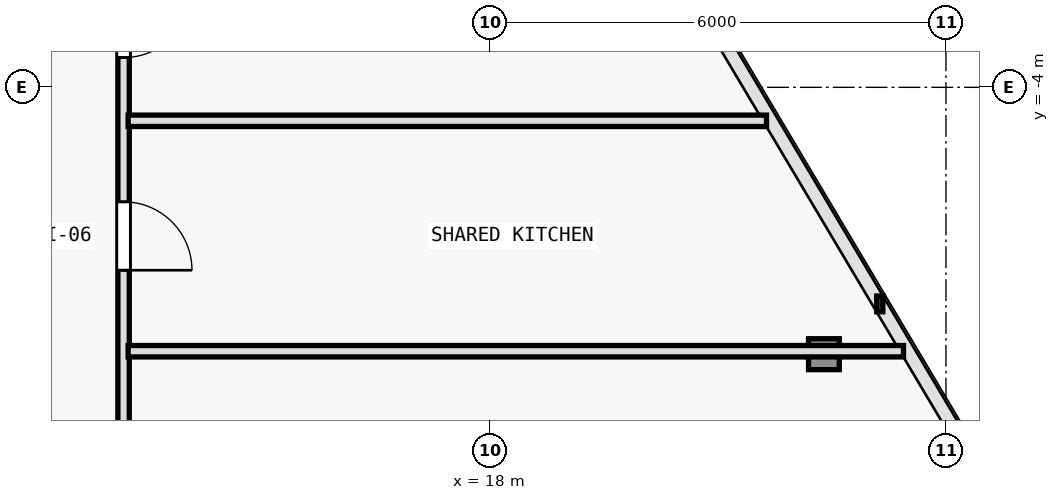
"""IFC4 building model, lengths in metres.
Left out: names, types, materials, properties, quantities, classifications, styles, units other than length and angle.
Written with IfcOpenShell. Run it as: python <this file> out.ifc"""

import sys

from ifc_helpers import new_model, si_unit, direction, frame, frame_2d, origin, origin_2d, place, context, subcontext, project, spatial, rectangle, i_section, extrude, element, fill, save


model = new_model("IFC4")
c1 = context("Model", 3, precision=1e-05, world=origin(), true_north=direction((0.0, 1.0)))
c2 = subcontext(c1, "Body", "Model", "MODEL_VIEW")
j1 = project(units=[si_unit("LENGTHUNIT", "METRE"), si_unit("PLANEANGLEUNIT", "RADIAN")], contexts=[c1])
p1 = place(None, origin())
s1 = spatial("IfcSite", under=j1, at=p1, CompositionType="ELEMENT")
p2 = place(p1, origin())
s2 = spatial("IfcBuilding", under=s1, at=p2, CompositionType="ELEMENT")
p3 = place(p2, frame((0.0, 0.0, 138.6)))
s3 = spatial("IfcBuildingStorey", under=s2, at=p3, CompositionType="ELEMENT", Elevation=138.6)
p4 = place(p3, frame((22.394, -7.51, 0.005), z_axis=(-0.026037763904, 0.021550838532, 0.999428634876), x_axis=(-0.637608877662, -0.770360252821, 0.0)))
e1 = element("IfcColumn", 1, at=p4, inside=s3, PredefinedType="COLUMN", context=c2, shape_type="SweptSolid", body=[
    extrude(i_section(OverallWidth=0.404, OverallDepth=0.407, WebThickness=0.017, FlangeThickness=0.028, FilletRadius=0.015, at=origin_2d()), origin(), (0.0, 0.0, 1.0), 3.591),
])
p5 = place(p3, frame((13.18, 8.444, 0.0), z_axis=(0.0, 0.0, 1.0), x_axis=(0.0, -1.0, 0.0)))
e2 = element("IfcWall", 2, at=p5, inside=s3, PredefinedType="PARTITIONING", context=c2, shape_type="SweptSolid", body=[
    extrude(rectangle(XDim=20.004, YDim=0.15, at=frame_2d((10.002, 0.0))), origin(), (0.0, 0.0, 1.0), 2.705),
])
p6 = place(p5, frame((17.421, 0.0, 0.0)))
e3 = element("IfcOpeningElement", 3, at=p6, cuts=e2, PredefinedType="OPENING", context=c2, shape_type="SweptSolid", body=[
    extrude(rectangle(XDim=0.9, YDim=2.1, at=frame_2d((0.45, 1.05))), frame((0.0, 0.085, 0.0), z_axis=(0.0, -1.0, 0.0), x_axis=(1.0, 0.0, 0.0)), (0.0, 0.0, 1.0), 0.17),
])
p7 = place(p5, frame((13.95, 0.0, 0.0)))
e4 = element("IfcOpeningElement", 4, at=p7, cuts=e2, PredefinedType="OPENING", context=c2, shape_type="SweptSolid", body=[
    extrude(rectangle(XDim=0.9, YDim=2.1, at=frame_2d((0.45, 1.05))), frame((0.0, 0.085, 0.0), z_axis=(0.0, -1.0, 0.0), x_axis=(1.0, 0.0, 0.0)), (0.0, 0.0, 1.0), 0.17),
])
p8 = place(p5, frame((11.153, 0.0, 0.0)))
e5 = element("IfcOpeningElement", 5, at=p8, cuts=e2, PredefinedType="OPENING", context=c2, shape_type="SweptSolid", body=[
    extrude(rectangle(XDim=0.9, YDim=2.1, at=frame_2d((0.45, 1.05))), frame((0.0, 0.085, 0.0), z_axis=(0.0, -1.0, 0.0), x_axis=(1.0, 0.0, 0.0)), (0.0, 0.0, 1.0), 0.17),
])
p9 = place(p5, frame((8.693, 0.0, 0.0)))
e6 = element("IfcOpeningElement", 6, at=p9, cuts=e2, PredefinedType="OPENING", context=c2, shape_type="SweptSolid", body=[
    extrude(rectangle(XDim=0.9, YDim=2.1, at=frame_2d((0.45, 1.05))), frame((0.0, 0.085, 0.0), z_axis=(0.0, -1.0, 0.0), x_axis=(1.0, 0.0, 0.0)), (0.0, 0.0, 1.0), 0.17),
])
p10 = place(p5, frame((6.129, 0.0, 0.0)))
e7 = element("IfcOpeningElement", 7, at=p10, cuts=e2, PredefinedType="OPENING", context=c2, shape_type="SweptSolid", body=[
    extrude(rectangle(XDim=0.9, YDim=2.1, at=frame_2d((0.45, 1.05))), frame((0.0, 0.085, 0.0), z_axis=(0.0, -1.0, 0.0), x_axis=(1.0, 0.0, 0.0)), (0.0, 0.0, 1.0), 0.17),
])
p11 = place(p5, frame((2.236, 0.0, 0.0)))
e8 = element("IfcOpeningElement", 8, at=p11, cuts=e2, PredefinedType="OPENING", context=c2, shape_type="SweptSolid", body=[
    extrude(rectangle(XDim=0.9, YDim=2.1, at=frame_2d((0.45, 1.05))), frame((0.0, 0.085, 0.0), z_axis=(0.0, -1.0, 0.0), x_axis=(1.0, 0.0, 0.0)), (0.0, 0.0, 1.0), 0.17),
])
p12 = place(p3, frame((13.24, -7.472, 0.0), z_axis=(0.0, 0.0, 1.0), x_axis=(1.0, 0.0, 0.0)))
e9 = element("IfcWall", 9, at=p12, inside=s3, PredefinedType="PARTITIONING", context=c2, shape_type="SweptSolid", body=[
    extrude(rectangle(XDim=10.201, YDim=0.15, at=frame_2d((5.101, 0.0))), origin(), (0.0, 0.0, 1.0), 2.705),
])
p13 = place(p3, frame((13.24, -4.44, 0.0), z_axis=(0.0, 0.0, 1.0), x_axis=(1.0, 0.0, 0.0)))
e10 = element("IfcWall", 10, at=p13, inside=s3, PredefinedType="PARTITIONING", context=c2, shape_type="SweptSolid", body=[
    extrude(rectangle(XDim=8.399, YDim=0.15, at=frame_2d((4.199, 0.0))), origin(), (0.0, 0.0, 1.0), 2.885),
])
p14 = place(p7, origin())
e11 = element("IfcDoor", 11, at=p14, inside=s3, OperationType="SINGLE_SWING_RIGHT", PredefinedType="DOOR", context=c2, shape_type="SweptSolid", body=[
    extrude(rectangle(XDim=0.9, YDim=2.1, at=frame_2d((0.45, 1.05))), frame((0.0, 0.025, 0.0), z_axis=(0.0, -1.0, 0.0), x_axis=(1.0, 0.0, 0.0)), (0.0, 0.0, 1.0), 0.05),
])
fill(e4, e11)
p15 = place(p8, origin())
e12 = element("IfcDoor", 12, at=p15, inside=s3, OperationType="SINGLE_SWING_LEFT", PredefinedType="DOOR", context=c2, shape_type="SweptSolid", body=[
    extrude(rectangle(XDim=0.9, YDim=2.1, at=frame_2d((0.45, 1.05))), frame((0.0, 0.025, 0.0), z_axis=(0.0, -1.0, 0.0), x_axis=(1.0, 0.0, 0.0)), (0.0, 0.0, 1.0), 0.05),
])
fill(e5, e12)
save(model, sys.argv[1])
